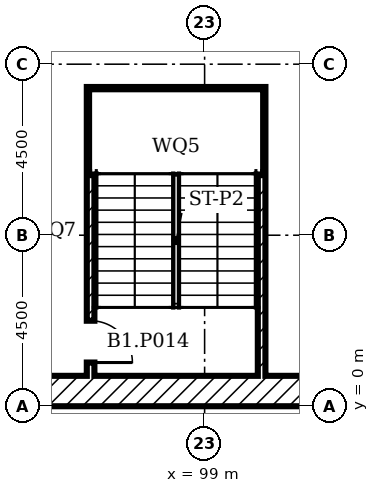
"""IFC4 building model, lengths in metres.
Left out: names, types, materials, properties, quantities, classifications, styles, units other than length and angle.
Written with IfcOpenShell. Run it as: python <this file> out.ifc"""

import sys

from ifc_helpers import new_model, si_unit, direction, frame, frame_2d, origin, place, context, subcontext, project, spatial, rectangle, extrude, element, fill, save


model = new_model("IFC4")
c1 = context("Model", 3, precision=1e-05, world=origin(), true_north=direction((0.0, 1.0)))
c2 = subcontext(c1, "Body", "Model", "MODEL_VIEW")
j1 = project(units=[si_unit("LENGTHUNIT", "METRE"), si_unit("PLANEANGLEUNIT", "RADIAN")], contexts=[c1])
p1 = place(None, origin())
s1 = spatial("IfcSite", under=j1, at=p1, CompositionType="ELEMENT")
p2 = place(p1, origin())
s2 = spatial("IfcBuilding", under=s1, at=p2, CompositionType="ELEMENT")
p3 = place(p2, frame((0.0, 0.0, -4.0)))
s3 = spatial("IfcBuildingStorey", under=s2, at=p3, CompositionType="ELEMENT", Elevation=-4.0)
p4 = place(p3, frame((0.0, 0.4, 0.0)))
e1 = element("IfcWall", 1, at=p4, inside=s3, PredefinedType="SOLIDWALL", context=c2, shape_type="SweptSolid", body=[
    extrude(rectangle(XDim=153.0, YDim=0.8, at=frame_2d((76.5, 0.0))), origin(), (0.0, 0.0, 1.0), 4.0),
])
p5 = place(p3, frame((96.0, 0.8, 0.0), z_axis=(0.0, 0.0, 1.0), x_axis=(0.0, 1.0, 0.0)))
e2 = element("IfcWall", 2, at=p5, inside=s3, PredefinedType="SOLIDWALL", context=c2, shape_type="SweptSolid", body=[
    extrude(rectangle(XDim=7.6, YDim=0.2, at=frame_2d((3.8, 0.0))), origin(), (0.0, 0.0, 1.0), 3.55),
])
p6 = place(p5, frame((0.35, 0.0, 0.0)))
e3 = element("IfcOpeningElement", 3, at=p6, cuts=e2, PredefinedType="OPENING", context=c2, shape_type="SweptSolid", body=[
    extrude(rectangle(XDim=1.1, YDim=2.1, at=frame_2d((0.55, 1.05))), frame((0.0, 0.11, 0.0), z_axis=(0.0, -1.0, 0.0), x_axis=(1.0, 0.0, 0.0)), (0.0, 0.0, 1.0), 0.22),
])
p7 = place(p3, frame((100.5, 0.8, 0.0), z_axis=(0.0, 0.0, 1.0), x_axis=(0.0, 1.0, 0.0)))
e4 = element("IfcWall", 4, at=p7, inside=s3, PredefinedType="SOLIDWALL", context=c2, shape_type="SweptSolid", body=[
    extrude(rectangle(XDim=7.6, YDim=0.2, at=frame_2d((3.8, 0.0))), origin(), (0.0, 0.0, 1.0), 3.55),
])
p8 = place(p3, frame((96.1, 8.3, 0.0)))
e5 = element("IfcWall", 5, at=p8, inside=s3, PredefinedType="SOLIDWALL", context=c2, shape_type="SweptSolid", body=[
    extrude(rectangle(XDim=4.3, YDim=0.2, at=frame_2d((2.15, 0.0))), origin(), (0.0, 0.0, 1.0), 3.55),
])
for number, where in (
    (6, (96.1, 6.22, -2.0)),
    (7, (96.1, 7.6, -2.0)),
):
    element("IfcWall", number, at=place(p3, frame(where)), inside=s3, PredefinedType="SOLIDWALL", context=c2, shape_type="SweptSolid", body=[
        extrude(rectangle(XDim=4.3, YDim=0.2, at=frame_2d((2.15, 0.0))), origin(), (0.0, 0.0, 1.0), 3.8),
    ])
p9 = place(p6, frame((1.1, 0.0, 0.0), x_axis=(-1.0, 0.0, 0.0)))
e8 = element("IfcDoor", 8, at=p9, inside=s3, OperationType="SINGLE_SWING_LEFT", PredefinedType="DOOR", context=c2, shape_type="SweptSolid", body=[
    extrude(rectangle(XDim=1.1, YDim=2.1, at=frame_2d((0.55, 1.05))), frame((0.0, 0.025, 0.0), z_axis=(0.0, -1.0, 0.0), x_axis=(1.0, 0.0, 0.0)), (0.0, 0.0, 1.0), 0.05),
])
fill(e3, e8)
save(model, sys.argv[1])
